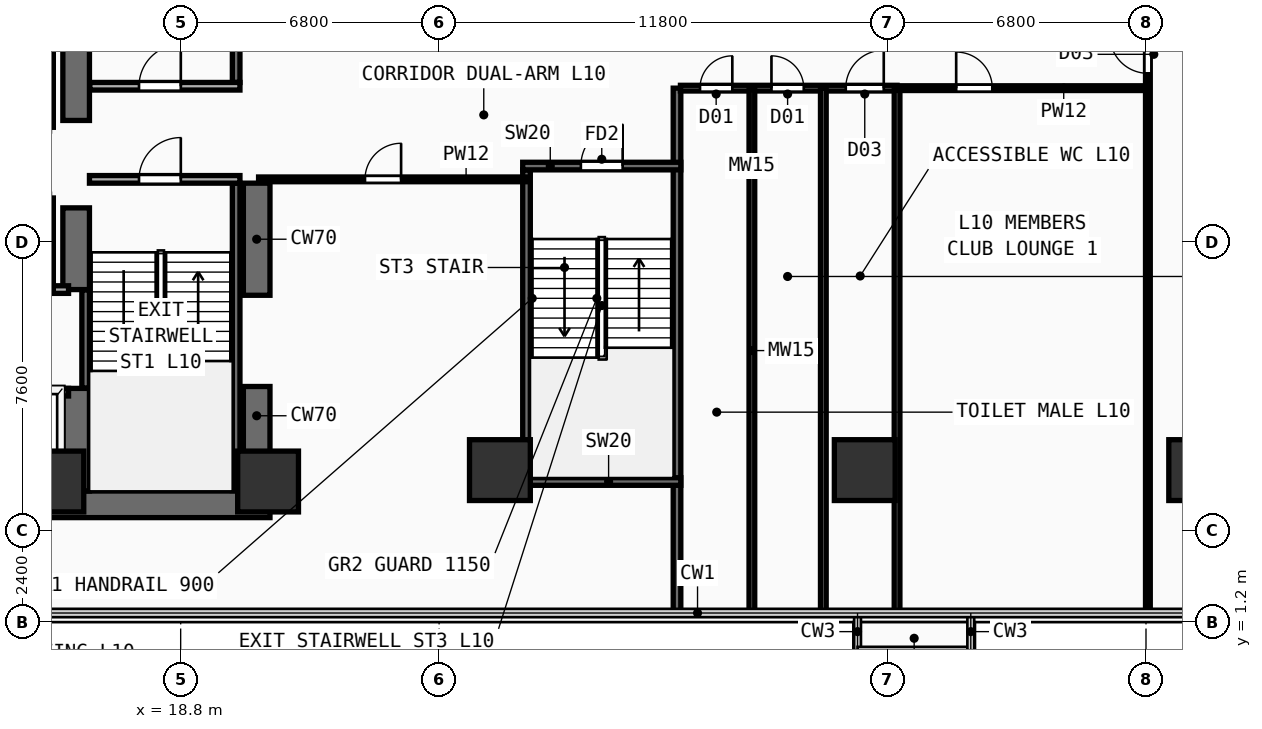
"""IFC4 building model, lengths in metres.
Left out: names, types, materials, properties, quantities, classifications, styles, units other than length and angle.
Written with IfcOpenShell. Run it as: python <this file> out.ifc"""

import sys

from ifc_helpers import new_model, si_unit, direction, frame, frame_2d, origin, origin_2d, place, context, subcontext, project, spatial, rectangle, extrude, element, fill, save


model = new_model("IFC4")
c1 = context("Model", 3, precision=1e-05, world=origin(), true_north=direction((0.0, 1.0)))
c2 = subcontext(c1, "Body", "Model", "MODEL_VIEW")
j1 = project(units=[si_unit("LENGTHUNIT", "METRE"), si_unit("PLANEANGLEUNIT", "RADIAN")], contexts=[c1])
p1 = place(None, origin())
s1 = spatial("IfcSite", under=j1, at=p1, CompositionType="ELEMENT")
p2 = place(p1, origin())
s2 = spatial("IfcBuilding", under=s1, at=p2, CompositionType="ELEMENT")
p3 = place(p2, frame((0.0, 0.0, 41.0)))
s3 = spatial("IfcBuildingStorey", under=s2, at=p3, CompositionType="ELEMENT", Elevation=41.0)
p4 = place(p3, frame((7.1, 4.3, 0.0), z_axis=(0.0, 0.0, 1.0), x_axis=(1.0, 0.0, 0.0)))
e1 = element("IfcWall", 1, at=p4, inside=s3, PredefinedType="SHEAR", context=c2, shape_type="SweptSolid", body=[
    extrude(rectangle(XDim=14.05, YDim=0.7, at=frame_2d((7.025, 0.0))), origin(), (0.0, 0.0, 1.0), 3.54),
])
p5 = place(p3, frame((20.8, 4.65, 0.0), z_axis=(0.0, 0.0, 1.0), x_axis=(0.0, 1.0, 0.0)))
e2 = element("IfcWall", 2, at=p5, inside=s3, PredefinedType="SHEAR", context=c2, shape_type="SweptSolid", body=[
    extrude(rectangle(XDim=2.75, YDim=0.7, at=frame_2d((1.375, 0.0))), origin(), (0.0, 0.0, 1.0), 3.54),
])
p6 = place(p3, frame((20.8, 9.8, 0.0), z_axis=(0.0, 0.0, 1.0), x_axis=(0.0, 1.0, 0.0)))
e3 = element("IfcWall", 3, at=p6, inside=s3, PredefinedType="SHEAR", context=c2, shape_type="SweptSolid", body=[
    extrude(rectangle(XDim=2.95, YDim=0.7, at=frame_2d((1.475, 0.0))), origin(), (0.0, 0.0, 1.0), 3.54),
])
p7 = place(p3, frame((16.05, 4.65, 0.0), z_axis=(0.0, 0.0, 1.0), x_axis=(0.0, 1.0, 0.0)))
e4 = element("IfcWall", 4, at=p7, inside=s3, PredefinedType="SHEAR", context=c2, shape_type="SweptSolid", body=[
    extrude(rectangle(XDim=2.7, YDim=0.7, at=frame_2d((1.35, 0.0))), origin(), (0.0, 0.0, 1.0), 3.54),
])
p8 = place(p3, frame((16.05, 9.95, 0.0), z_axis=(0.0, 0.0, 1.0), x_axis=(0.0, 1.0, 0.0)))
e5 = element("IfcWall", 5, at=p8, inside=s3, PredefinedType="SHEAR", context=c2, shape_type="SweptSolid", body=[
    extrude(rectangle(XDim=2.15, YDim=0.7, at=frame_2d((1.075, 0.0))), origin(), (0.0, 0.0, 1.0), 3.54),
])
p9 = place(p3, frame((16.05, 14.4, 0.0), z_axis=(0.0, 0.0, 1.0), x_axis=(0.0, 1.0, 0.0)))
e6 = element("IfcWall", 6, at=p9, inside=s3, PredefinedType="SHEAR", context=c2, shape_type="SweptSolid", body=[
    extrude(rectangle(XDim=9.1, YDim=0.7, at=frame_2d((4.55, 0.0))), origin(), (0.0, 0.0, 1.0), 3.54),
])
for number, where, z_axis, x_axis in (
    (7, (15.45, 4.9, 0.0), (0.0, 0.0, 1.0), (1.0, 0.0, 0.0)),
    (8, (21.1, 4.9, 0.0), (0.0, 0.0, 1.0), (1.0, 0.0, 0.0)),
    (9, (27.2, 5.2, 0.0), (0.0, 0.0, 1.0), (1.0, 0.0, 0.0)),
    (10, (36.8, 5.2, 0.0), (0.0, 0.0, 1.0), (1.0, 0.0, 0.0)),
    (11, (45.6, 5.2, 0.0), (0.0, 0.0, 1.0), (1.0, 0.0, 0.0)),
):
    element("IfcColumn", number, at=place(p3, frame(where, z_axis=z_axis, x_axis=x_axis)), inside=s3, PredefinedType="COLUMN", context=c2, shape_type="SweptSolid", body=[
        extrude(rectangle(XDim=1.6, YDim=1.6, at=origin_2d()), origin(), (0.0, 0.0, 1.0), 3.54),
    ])
p10 = place(p3, frame((16.3, 7.36, 0.0), z_axis=(0.0, 0.0, 1.0), x_axis=(0.0, 1.0, 0.0)))
e12 = element("IfcWall", 12, at=p10, inside=s3, PredefinedType="SHEAR", context=c2, shape_type="SweptSolid", body=[
    extrude(rectangle(XDim=2.58, YDim=0.2, at=frame_2d((1.29, 0.0))), origin(), (0.0, 0.0, 1.0), 3.54),
])
p11 = place(p3, frame((20.26, 4.66, 0.0), z_axis=(0.0, 0.0, 1.0), x_axis=(0.0, 1.0, 0.0)))
e13 = element("IfcWall", 13, at=p11, inside=s3, PredefinedType="SHEAR", context=c2, shape_type="SweptSolid", body=[
    extrude(rectangle(XDim=8.09, YDim=0.2, at=frame_2d((4.045, 0.0))), origin(), (0.0, 0.0, 1.0), 3.54),
])
p12 = place(p3, frame((16.4, 12.85, 0.0), z_axis=(0.0, 0.0, 1.0), x_axis=(1.0, 0.0, 0.0)))
e14 = element("IfcWall", 14, at=p12, inside=s3, PredefinedType="PARTITIONING", context=c2, shape_type="SweptSolid", body=[
    extrude(rectangle(XDim=3.96, YDim=0.2, at=frame_2d((1.98, 0.0))), origin(), (0.0, 0.0, 1.0), 3.54),
])
p13 = place(p12, frame((1.304, 0.0, 0.0)))
e15 = element("IfcOpeningElement", 15, at=p13, cuts=e14, PredefinedType="OPENING", context=c2, shape_type="SweptSolid", body=[
    extrude(rectangle(XDim=1.1, YDim=2.2, at=frame_2d((0.55, 1.1))), frame((0.0, 0.11, 0.0), z_axis=(0.0, -1.0, 0.0), x_axis=(1.0, 0.0, 0.0)), (0.0, 0.0, 1.0), 0.22),
])
p14 = place(p3, frame((20.26, 15.4, 0.0), z_axis=(0.0, 0.0, 1.0), x_axis=(0.0, 1.0, 0.0)))
e16 = element("IfcWall", 16, at=p14, inside=s3, PredefinedType="SHEAR", context=c2, shape_type="SweptSolid", body=[
    extrude(rectangle(XDim=8.09, YDim=0.2, at=frame_2d((4.045, 0.0))), origin(), (0.0, 0.0, 1.0), 3.54),
])
p15 = place(p3, frame((16.41, 15.3, 0.0), z_axis=(0.0, 0.0, 1.0), x_axis=(1.0, 0.0, 0.0)))
e17 = element("IfcWall", 17, at=p15, inside=s3, PredefinedType="PARTITIONING", context=c2, shape_type="SweptSolid", body=[
    extrude(rectangle(XDim=3.95, YDim=0.2, at=frame_2d((1.975, 0.0))), origin(), (0.0, 0.0, 1.0), 3.54),
])
p16 = place(p15, frame((1.294, 0.0, 0.0)))
e18 = element("IfcOpeningElement", 18, at=p16, cuts=e17, PredefinedType="OPENING", context=c2, shape_type="SweptSolid", body=[
    extrude(rectangle(XDim=1.1, YDim=2.2, at=frame_2d((0.55, 1.1))), frame((0.0, 0.11, 0.0), z_axis=(0.0, -1.0, 0.0), x_axis=(1.0, 0.0, 0.0)), (0.0, 0.0, 1.0), 0.22),
])
p17 = place(p3, frame((27.9, 5.0, 0.0), z_axis=(0.0, 0.0, 1.0), x_axis=(0.0, 1.0, 0.0)))
e19 = element("IfcWall", 19, at=p17, inside=s3, PredefinedType="SHEAR", context=c2, shape_type="SweptSolid", body=[
    extrude(rectangle(XDim=8.1, YDim=0.2, at=frame_2d((4.05, 0.0))), origin(), (0.0, 0.0, 1.0), 3.54),
])
p18 = place(p3, frame((31.86, 1.44, 0.0), z_axis=(0.0, 0.0, 1.0), x_axis=(0.0, 1.0, 0.0)))
e20 = element("IfcWall", 20, at=p18, inside=s3, PredefinedType="SHEAR", context=c2, shape_type="SweptSolid", body=[
    extrude(rectangle(XDim=13.81, YDim=0.2, at=frame_2d((6.905, 0.0))), origin(), (0.0, 0.0, 1.0), 3.54),
])
p19 = place(p3, frame((27.8, 4.9, 0.0), z_axis=(0.0, 0.0, 1.0), x_axis=(1.0, 0.0, 0.0)))
e21 = element("IfcWall", 21, at=p19, inside=s3, PredefinedType="SHEAR", context=c2, shape_type="SweptSolid", body=[
    extrude(rectangle(XDim=4.16, YDim=0.2, at=frame_2d((2.08, 0.0))), origin(), (0.0, 0.0, 1.0), 3.54),
])
p20 = place(p3, frame((27.8, 13.2, 0.0), z_axis=(0.0, 0.0, 1.0), x_axis=(1.0, 0.0, 0.0)))
e22 = element("IfcWall", 22, at=p20, inside=s3, PredefinedType="SHEAR", context=c2, shape_type="SweptSolid", body=[
    extrude(rectangle(XDim=4.16, YDim=0.2, at=frame_2d((2.08, 0.0))), origin(), (0.0, 0.0, 1.0), 3.54),
])
p21 = place(p20, frame((1.53, 0.0, 0.0)))
e23 = element("IfcOpeningElement", 23, at=p21, cuts=e22, PredefinedType="OPENING", context=c2, shape_type="SweptSolid", body=[
    extrude(rectangle(XDim=1.1, YDim=2.2, at=frame_2d((0.55, 1.1))), frame((0.0, 0.11, 0.0), z_axis=(0.0, -1.0, 0.0), x_axis=(1.0, 0.0, 0.0)), (0.0, 0.0, 1.0), 0.22),
])
p22 = place(p3, frame((7.5, 7.25, 0.0), z_axis=(0.0, 0.0, 1.0), x_axis=(1.0, 0.0, 0.0)))
e24 = element("IfcWall", 24, at=p22, inside=s3, PredefinedType="PARTITIONING", context=c2, shape_type="SweptSolid", body=[
    extrude(rectangle(XDim=8.35, YDim=0.2, at=frame_2d((4.175, 0.0))), origin(), (0.0, 0.0, 1.0), 3.54),
])
p23 = place(p22, frame((0.53, 0.0, 0.0)))
e25 = element("IfcOpeningElement", 25, at=p23, cuts=e24, PredefinedType="OPENING", context=c2, shape_type="SweptSolid", body=[
    extrude(rectangle(XDim=1.1, YDim=2.2, at=frame_2d((0.55, 1.1))), frame((0.0, 0.11, 0.0), z_axis=(0.0, -1.0, 0.0), x_axis=(1.0, 0.0, 0.0)), (0.0, 0.0, 1.0), 0.22),
])
p24 = place(p22, frame((2.37, 0.0, 0.0)))
e26 = element("IfcOpeningElement", 26, at=p24, cuts=e24, PredefinedType="OPENING", context=c2, shape_type="SweptSolid", body=[
    extrude(rectangle(XDim=1.1, YDim=2.2, at=frame_2d((0.55, 1.1))), frame((0.0, 0.11, 0.0), z_axis=(0.0, -1.0, 0.0), x_axis=(1.0, 0.0, 0.0)), (0.0, 0.0, 1.0), 0.22),
])
p25 = place(p22, frame((4.33, 0.0, 0.0)))
e27 = element("IfcOpeningElement", 27, at=p25, cuts=e24, PredefinedType="OPENING", context=c2, shape_type="SweptSolid", body=[
    extrude(rectangle(XDim=1.1, YDim=2.2, at=frame_2d((0.55, 1.1))), frame((0.0, 0.11, 0.0), z_axis=(0.0, -1.0, 0.0), x_axis=(1.0, 0.0, 0.0)), (0.0, 0.0, 1.0), 0.22),
])
p26 = place(p22, frame((6.5, 0.0, 0.0)))
e28 = element("IfcOpeningElement", 28, at=p26, cuts=e24, PredefinedType="OPENING", context=c2, shape_type="SweptSolid", body=[
    extrude(rectangle(XDim=1.1, YDim=2.2, at=frame_2d((0.55, 1.1))), frame((0.0, 0.11, 0.0), z_axis=(0.0, -1.0, 0.0), x_axis=(1.0, 0.0, 0.0)), (0.0, 0.0, 1.0), 0.22),
])
p27 = place(p3, frame((7.5, 9.95, 0.0), z_axis=(0.0, 0.0, 1.0), x_axis=(1.0, 0.0, 0.0)))
e29 = element("IfcWall", 29, at=p27, inside=s3, PredefinedType="PARTITIONING", context=c2, shape_type="SweptSolid", body=[
    extrude(rectangle(XDim=8.35, YDim=0.2, at=frame_2d((4.175, 0.0))), origin(), (0.0, 0.0, 1.0), 3.54),
])
p28 = place(p3, frame((15.35, 9.95, 0.0), z_axis=(0.0, 0.0, 1.0), x_axis=(0.0, 1.0, 0.0)))
e30 = element("IfcWall", 30, at=p28, inside=s3, PredefinedType="PARTITIONING", context=c2, shape_type="SweptSolid", body=[
    extrude(rectangle(XDim=2.41, YDim=0.2, at=frame_2d((1.205, 0.0))), origin(), (0.0, 0.0, 1.0), 3.54),
])
p29 = place(p3, frame((15.35, 14.22, 0.0), z_axis=(0.0, 0.0, 1.0), x_axis=(0.0, 1.0, 0.0)))
e31 = element("IfcWall", 31, at=p29, inside=s3, PredefinedType="PARTITIONING", context=c2, shape_type="SweptSolid", body=[
    extrude(rectangle(XDim=2.23, YDim=0.2, at=frame_2d((1.115, 0.0))), origin(), (0.0, 0.0, 1.0), 3.54),
])
p30 = place(p3, frame((31.95, 15.25, 0.0), z_axis=(0.0, 0.0, 1.0), x_axis=(1.0, 0.0, 0.0)))
e32 = element("IfcWall", 32, at=p30, inside=s3, PredefinedType="PLUMBINGWALL", context=c2, shape_type="SweptSolid", body=[
    extrude(rectangle(XDim=5.7, YDim=0.15, at=frame_2d((2.85, 0.0))), origin(), (0.0, 0.0, 1.0), 3.04),
])
p31 = place(p30, frame((0.515, 0.0, 0.0)))
e33 = element("IfcOpeningElement", 33, at=p31, cuts=e32, PredefinedType="OPENING", context=c2, shape_type="SweptSolid", body=[
    extrude(rectangle(XDim=0.85, YDim=2.15, at=frame_2d((0.425, 1.075))), frame((0.0, 0.085, 0.0), z_axis=(0.0, -1.0, 0.0), x_axis=(1.0, 0.0, 0.0)), (0.0, 0.0, 1.0), 0.17),
])
p32 = place(p30, frame((2.395, 0.0, 0.0)))
e34 = element("IfcOpeningElement", 34, at=p32, cuts=e32, PredefinedType="OPENING", context=c2, shape_type="SweptSolid", body=[
    extrude(rectangle(XDim=0.85, YDim=2.15, at=frame_2d((0.425, 1.075))), frame((0.0, 0.085, 0.0), z_axis=(0.0, -1.0, 0.0), x_axis=(1.0, 0.0, 0.0)), (0.0, 0.0, 1.0), 0.17),
])
p33 = place(p30, frame((4.35, 0.0, 0.0)))
e35 = element("IfcOpeningElement", 35, at=p33, cuts=e32, PredefinedType="OPENING", context=c2, shape_type="SweptSolid", body=[
    extrude(rectangle(XDim=1.0, YDim=2.2, at=frame_2d((0.5, 1.1))), frame((0.0, 0.085, 0.0), z_axis=(0.0, -1.0, 0.0), x_axis=(1.0, 0.0, 0.0)), (0.0, 0.0, 1.0), 0.17),
])
for number, where, z_axis, x_axis in (
    (36, (33.83, 1.44, 0.0), (0.0, 0.0, 1.0), (0.0, 1.0, 0.0)),
    (37, (35.71, 1.44, 0.0), (0.0, 0.0, 1.0), (0.0, 1.0, 0.0)),
    (38, (37.65, 1.44, 0.0), (0.0, 0.0, 1.0), (0.0, 1.0, 0.0)),
):
    element("IfcWall", number, at=place(p3, frame(where, z_axis=z_axis, x_axis=x_axis)), inside=s3, PredefinedType="PLUMBINGWALL", context=c2, shape_type="SweptSolid", body=[
        extrude(rectangle(XDim=13.81, YDim=0.15, at=frame_2d((6.905, 0.0))), origin(), (0.0, 0.0, 1.0), 3.54),
    ])
p34 = place(p3, frame((20.85, 12.85, 0.0), z_axis=(0.0, 0.0, 1.0), x_axis=(1.0, 0.0, 0.0)))
e39 = element("IfcWall", 39, at=p34, inside=s3, PredefinedType="PARTITIONING", context=c2, shape_type="SweptSolid", body=[
    extrude(rectangle(XDim=7.05, YDim=0.125, at=frame_2d((3.525, 0.0))), origin(), (0.0, 0.0, 1.0), 3.54),
])
p35 = place(p34, frame((2.8, 0.0, 0.0)))
e40 = element("IfcOpeningElement", 40, at=p35, cuts=e39, PredefinedType="OPENING", context=c2, shape_type="SweptSolid", body=[
    extrude(rectangle(XDim=0.95, YDim=2.15, at=frame_2d((0.475, 1.075))), frame((0.0, 0.073, 0.0), z_axis=(0.0, -1.0, 0.0), x_axis=(1.0, 0.0, 0.0)), (0.0, 0.0, 1.0), 0.145),
])
p36 = place(p3, frame((37.65, 15.25, 0.0), z_axis=(0.0, 0.0, 1.0), x_axis=(1.0, 0.0, 0.0)))
e41 = element("IfcWall", 41, at=p36, inside=s3, PredefinedType="PARTITIONING", context=c2, shape_type="SweptSolid", body=[
    extrude(rectangle(XDim=6.6, YDim=0.125, at=frame_2d((3.3, 0.0))), origin(), (0.0, 0.0, 1.0), 3.04),
])
p37 = place(p36, frame((1.556, 0.0, 0.0)))
e42 = element("IfcOpeningElement", 42, at=p37, cuts=e41, PredefinedType="OPENING", context=c2, shape_type="SweptSolid", body=[
    extrude(rectangle(XDim=0.95, YDim=2.15, at=frame_2d((0.475, 1.075))), frame((0.0, 0.073, 0.0), z_axis=(0.0, -1.0, 0.0), x_axis=(1.0, 0.0, 0.0)), (0.0, 0.0, 1.0), 0.145),
])
p38 = place(p3, frame((44.25, 1.44, 0.0), z_axis=(0.0, 0.0, 1.0), x_axis=(0.0, 1.0, 0.0)))
e43 = element("IfcWall", 43, at=p38, inside=s3, PredefinedType="PARTITIONING", context=c2, shape_type="SweptSolid", body=[
    extrude(rectangle(XDim=22.12, YDim=0.125, at=frame_2d((11.06, 0.0))), origin(), (0.0, 0.0, 1.0), 3.54),
])
p39 = place(p38, frame((14.2, 0.0, 0.0)))
e44 = element("IfcOpeningElement", 44, at=p39, cuts=e43, PredefinedType="OPENING", context=c2, shape_type="SweptSolid", body=[
    extrude(rectangle(XDim=1.0, YDim=2.2, at=frame_2d((0.5, 1.1))), frame((0.0, 0.073, 0.0), z_axis=(0.0, -1.0, 0.0), x_axis=(1.0, 0.0, 0.0)), (0.0, 0.0, 1.0), 0.145),
])
p40 = place(p13, frame((1.1, 0.0, 0.0), z_axis=(0.0, 0.0, 1.0), x_axis=(-1.0, 0.0, 0.0)))
e45 = element("IfcDoor", 45, at=p40, inside=s3, OperationType="SINGLE_SWING_LEFT", PredefinedType="DOOR", context=c2, shape_type="SweptSolid", body=[
    extrude(rectangle(XDim=1.1, YDim=2.2, at=frame_2d((0.55, 1.1))), frame((0.0, 0.025, 0.0), z_axis=(0.0, -1.0, 0.0), x_axis=(1.0, 0.0, 0.0)), (0.0, 0.0, 1.0), 0.05),
])
fill(e15, e45)
p41 = place(p16, origin())
e46 = element("IfcDoor", 46, at=p41, inside=s3, OperationType="SINGLE_SWING_RIGHT", PredefinedType="DOOR", context=c2, shape_type="SweptSolid", body=[
    extrude(rectangle(XDim=1.1, YDim=2.2, at=frame_2d((0.55, 1.1))), frame((0.0, 0.025, 0.0), z_axis=(0.0, -1.0, 0.0), x_axis=(1.0, 0.0, 0.0)), (0.0, 0.0, 1.0), 0.05),
])
fill(e18, e46)
p42 = place(p21, frame((1.1, 0.0, 0.0), z_axis=(0.0, 0.0, 1.0), x_axis=(-1.0, 0.0, 0.0)))
e47 = element("IfcDoor", 47, at=p42, inside=s3, OperationType="SINGLE_SWING_LEFT", PredefinedType="DOOR", context=c2, shape_type="SweptSolid", body=[
    extrude(rectangle(XDim=1.1, YDim=2.2, at=frame_2d((0.55, 1.1))), frame((0.0, 0.025, 0.0), z_axis=(0.0, -1.0, 0.0), x_axis=(1.0, 0.0, 0.0)), (0.0, 0.0, 1.0), 0.05),
])
fill(e23, e47)
p43 = place(p31, origin())
e48 = element("IfcDoor", 48, at=p43, inside=s3, OperationType="SINGLE_SWING_RIGHT", PredefinedType="DOOR", context=c2, shape_type="SweptSolid", body=[
    extrude(rectangle(XDim=0.85, YDim=2.15, at=frame_2d((0.425, 1.075))), frame((0.0, 0.025, 0.0), z_axis=(0.0, -1.0, 0.0), x_axis=(1.0, 0.0, 0.0)), (0.0, 0.0, 1.0), 0.05),
])
fill(e33, e48)
p44 = place(p32, origin())
e49 = element("IfcDoor", 49, at=p44, inside=s3, OperationType="SINGLE_SWING_LEFT", PredefinedType="DOOR", context=c2, shape_type="SweptSolid", body=[
    extrude(rectangle(XDim=0.85, YDim=2.15, at=frame_2d((0.425, 1.075))), frame((0.0, 0.025, 0.0), z_axis=(0.0, -1.0, 0.0), x_axis=(1.0, 0.0, 0.0)), (0.0, 0.0, 1.0), 0.05),
])
fill(e34, e49)
p45 = place(p33, origin())
e50 = element("IfcDoor", 50, at=p45, inside=s3, OperationType="SINGLE_SWING_RIGHT", PredefinedType="DOOR", context=c2, shape_type="SweptSolid", body=[
    extrude(rectangle(XDim=1.0, YDim=2.2, at=frame_2d((0.5, 1.1))), frame((0.0, 0.025, 0.0), z_axis=(0.0, -1.0, 0.0), x_axis=(1.0, 0.0, 0.0)), (0.0, 0.0, 1.0), 0.05),
])
fill(e35, e50)
p46 = place(p35, origin())
e51 = element("IfcDoor", 51, at=p46, inside=s3, OperationType="SINGLE_SWING_RIGHT", PredefinedType="DOOR", context=c2, shape_type="SweptSolid", body=[
    extrude(rectangle(XDim=0.95, YDim=2.15, at=frame_2d((0.475, 1.075))), frame((0.0, 0.025, 0.0), z_axis=(0.0, -1.0, 0.0), x_axis=(1.0, 0.0, 0.0)), (0.0, 0.0, 1.0), 0.05),
])
fill(e40, e51)
p47 = place(p37, origin())
e52 = element("IfcDoor", 52, at=p47, inside=s3, OperationType="SINGLE_SWING_LEFT", PredefinedType="DOOR", context=c2, shape_type="SweptSolid", body=[
    extrude(rectangle(XDim=0.95, YDim=2.15, at=frame_2d((0.475, 1.075))), frame((0.0, 0.025, 0.0), z_axis=(0.0, -1.0, 0.0), x_axis=(1.0, 0.0, 0.0)), (0.0, 0.0, 1.0), 0.05),
])
fill(e42, e52)
p48 = place(p39, origin())
e53 = element("IfcDoor", 53, at=p48, inside=s3, OperationType="SINGLE_SWING_RIGHT", PredefinedType="DOOR", context=c2, shape_type="SweptSolid", body=[
    extrude(rectangle(XDim=1.0, YDim=2.2, at=frame_2d((0.5, 1.1))), frame((0.0, 0.025, 0.0), z_axis=(0.0, -1.0, 0.0), x_axis=(1.0, 0.0, 0.0)), (0.0, 0.0, 1.0), 0.05),
])
fill(e44, e53)
save(model, sys.argv[1])
